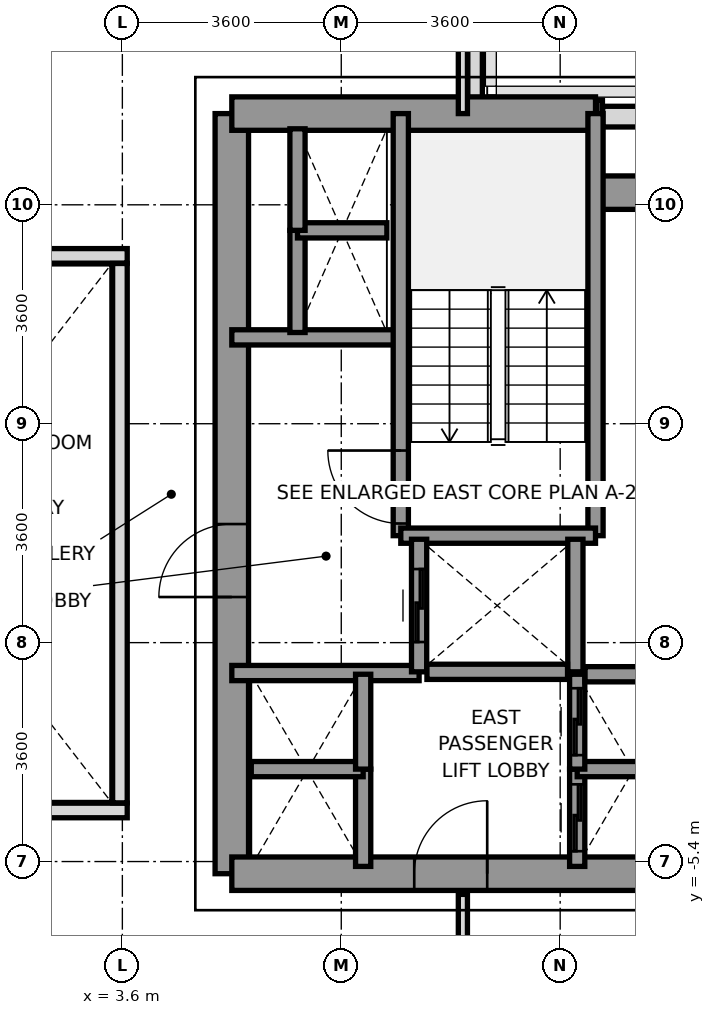
"""IFC4 building model, lengths in metres.
Left out: names, types, materials, properties, quantities, classifications, styles, units other than length and angle.
Written with IfcOpenShell. Run it as: python <this file> out.ifc"""

import sys

from ifc_helpers import new_model, si_unit, direction, frame, frame_2d, origin, place, context, subcontext, project, spatial, rectangle, extrude, source, transform, mapped, element, fill, save


model = new_model("IFC4")
c1 = context("Model", 3, precision=1e-05, world=origin(), true_north=direction((0.0, 1.0)))
c2 = subcontext(c1, "Body", "Model", "MODEL_VIEW")
j1 = project(units=[si_unit("LENGTHUNIT", "METRE"), si_unit("PLANEANGLEUNIT", "RADIAN")], contexts=[c1])
p1 = place(None, origin())
s1 = spatial("IfcSite", under=j1, at=p1, CompositionType="ELEMENT")
p2 = place(p1, origin())
s2 = spatial("IfcBuilding", under=s1, at=p2, CompositionType="ELEMENT")
p3 = place(p2, frame((0.0, 0.0, 44.2)))
s3 = spatial("IfcBuildingStorey", under=s2, at=p3, CompositionType="ELEMENT", Elevation=44.2)
p4 = place(p3, frame((11.498, 6.85, 0.0), z_axis=(0.0, 0.0, 1.0), x_axis=(1.0, 0.0, 0.0)))
e1 = element("IfcWall", 1, at=p4, inside=s3, PredefinedType="SOLIDWALL", context=c2, shape_type="SweptSolid", body=[
    extrude(rectangle(XDim=2.535, YDim=0.34, at=frame_2d((1.268, 0.0))), origin(), (0.0, 0.0, 1.0), 3.2),
])
p5 = place(p3, frame((9.4, 8.397, 0.0), z_axis=(0.0, 0.0, 1.0), x_axis=(0.0, -1.0, 0.0)))
e2 = element("IfcWall", 2, at=p5, inside=s3, PredefinedType="PARAPET", context=c2, shape_type="SweptSolid", body=[
    extrude(rectangle(XDim=1.444, YDim=0.24, at=frame_2d((0.722, 0.0))), origin(), (0.0, 0.0, 1.0), 1.15),
])
p6 = place(p3, frame((11.403, 7.0, 0.0), z_axis=(0.0, 0.0, 1.0), x_axis=(1.0, 0.0, 0.0)))
e3 = element("IfcWall", 3, at=p6, inside=s3, PredefinedType="PARAPET", context=c2, shape_type="SweptSolid", body=[
    extrude(rectangle(XDim=0.092, YDim=0.24, at=frame_2d((0.046, 0.0))), origin(), (0.0, 0.0, 1.0), 1.15),
])
p7 = place(p3, frame((5.4, -5.6, 0.0), z_axis=(0.0, 0.0, 1.0), x_axis=(0.0, 1.0, 0.0)))
e4 = element("IfcWall", 4, at=p7, inside=s3, PredefinedType="SHEAR", context=c2, shape_type="SweptSolid", body=[
    extrude(rectangle(XDim=12.5, YDim=0.55, at=frame_2d((6.25, 0.0))), origin(), (0.0, 0.0, 1.0), 3.2),
])
p8 = place(p7, frame((4.55, 0.0, 0.0)))
e5 = element("IfcOpeningElement", 5, at=p8, cuts=e4, PredefinedType="OPENING", context=c2, shape_type="SweptSolid", body=[
    extrude(rectangle(XDim=1.2, YDim=2.2, at=frame_2d((0.6, 1.1))), frame((0.0, 0.285, 0.0), z_axis=(0.0, -1.0, 0.0), x_axis=(1.0, 0.0, 0.0)), (0.0, 0.0, 1.0), 0.57),
])
p9 = place(p3, frame((5.4, 6.9, 0.0), z_axis=(0.0, 0.0, 1.0), x_axis=(1.0, 0.0, 0.0)))
e6 = element("IfcWall", 6, at=p9, inside=s3, PredefinedType="SHEAR", context=c2, shape_type="SweptSolid", body=[
    extrude(rectangle(XDim=5.981, YDim=0.55, at=frame_2d((2.991, 0.0))), origin(), (0.0, 0.0, 1.0), 3.2),
])
p10 = place(p3, frame((11.381, 5.6, 0.0), z_axis=(0.0, 0.0, 1.0), x_axis=(1.0, 0.0, 0.0)))
e7 = element("IfcWall", 7, at=p10, inside=s3, PredefinedType="SHEAR", context=c2, shape_type="SweptSolid", body=[
    extrude(rectangle(XDim=1.819, YDim=0.55, at=frame_2d((0.909, 0.0))), origin(), (0.0, 0.0, 1.0), 3.2),
])
p11 = place(p3, frame((5.4, -5.6, 0.0), z_axis=(0.0, 0.0, 1.0), x_axis=(1.0, 0.0, 0.0)))
e8 = element("IfcWall", 8, at=p11, inside=s3, PredefinedType="SHEAR", context=c2, shape_type="SweptSolid", body=[
    extrude(rectangle(XDim=7.8, YDim=0.55, at=frame_2d((3.9, 0.0))), origin(), (0.0, 0.0, 1.0), 3.2),
])
p12 = place(p11, frame((3.0, 0.0, 0.0)))
e9 = element("IfcOpeningElement", 9, at=p12, cuts=e8, PredefinedType="OPENING", context=c2, shape_type="SweptSolid", body=[
    extrude(rectangle(XDim=1.2, YDim=2.2, at=frame_2d((0.6, 1.1))), frame((0.0, 0.285, 0.0), z_axis=(0.0, -1.0, 0.0), x_axis=(1.0, 0.0, 0.0)), (0.0, 0.0, 1.0), 0.57),
])
p13 = place(p3, frame((5.4, 3.22, 0.0), z_axis=(0.0, 0.0, 1.0), x_axis=(1.0, 0.0, 0.0)))
e10 = element("IfcWall", 10, at=p13, inside=s3, PredefinedType="SOLIDWALL", context=c2, shape_type="SweptSolid", body=[
    extrude(rectangle(XDim=2.78, YDim=0.25, at=frame_2d((1.39, 0.0))), origin(), (0.0, 0.0, 1.0), 3.2),
])
p14 = place(p3, frame((5.4, -2.3, 0.0), z_axis=(0.0, 0.0, 1.0), x_axis=(1.0, 0.0, 0.0)))
e11 = element("IfcWall", 11, at=p14, inside=s3, PredefinedType="SOLIDWALL", context=c2, shape_type="SweptSolid", body=[
    extrude(rectangle(XDim=3.08, YDim=0.25, at=frame_2d((1.54, 0.0))), origin(), (0.0, 0.0, 1.0), 3.2),
])
p15 = place(p3, frame((8.179, -0.041, 0.0), z_axis=(0.0, 0.0, 1.0), x_axis=(0.0, 1.0, 0.0)))
e12 = element("IfcWall", 12, at=p15, inside=s3, PredefinedType="SOLIDWALL", context=c2, shape_type="SweptSolid", body=[
    extrude(rectangle(XDim=6.941, YDim=0.25, at=frame_2d((3.47, 0.0))), origin(), (0.0, 0.0, 1.0), 3.2),
])
p16 = place(p15, frame((0.2, 0.0, 0.0)))
e13 = element("IfcOpeningElement", 13, at=p16, cuts=e12, PredefinedType="OPENING", context=c2, shape_type="SweptSolid", body=[
    extrude(rectangle(XDim=1.2, YDim=2.2, at=frame_2d((0.6, 1.1))), frame((0.0, 0.135, 0.0), z_axis=(0.0, -1.0, 0.0), x_axis=(1.0, 0.0, 0.0)), (0.0, 0.0, 1.0), 0.27),
])
p17 = place(p3, frame((11.381, -0.041, 0.0), z_axis=(0.0, 0.0, 1.0), x_axis=(0.0, 1.0, 0.0)))
e14 = element("IfcWall", 14, at=p17, inside=s3, PredefinedType="SOLIDWALL", context=c2, shape_type="SweptSolid", body=[
    extrude(rectangle(XDim=6.941, YDim=0.25, at=frame_2d((3.47, 0.0))), origin(), (0.0, 0.0, 1.0), 3.2),
])
p18 = place(p3, frame((8.179, -0.041, 0.0), z_axis=(0.0, 0.0, 1.0), x_axis=(1.0, 0.0, 0.0)))
e15 = element("IfcWall", 15, at=p18, inside=s3, PredefinedType="SOLIDWALL", context=c2, shape_type="SweptSolid", body=[
    extrude(rectangle(XDim=3.202, YDim=0.25, at=frame_2d((1.601, 0.0))), origin(), (0.0, 0.0, 1.0), 3.2),
])
p19 = place(p3, frame((8.48, -2.28, 0.0), z_axis=(0.0, 0.0, 1.0), x_axis=(0.0, 1.0, 0.0)))
e16 = element("IfcWall", 16, at=p19, inside=s3, PredefinedType="SOLIDWALL", context=c2, shape_type="SweptSolid", body=[
    extrude(rectangle(XDim=2.18, YDim=0.25, at=frame_2d((1.09, 0.0))), origin(), (0.0, 0.0, 1.0), 3.2),
])
p20 = place(p19, frame((0.49, 0.0, 0.0)))
e17 = element("IfcOpeningElement", 17, at=p20, cuts=e16, PredefinedType="OPENING", context=c2, shape_type="SweptSolid", body=[
    extrude(rectangle(XDim=1.2, YDim=2.2, at=frame_2d((0.6, 1.1))), frame((0.0, 0.135, 0.0), z_axis=(0.0, -1.0, 0.0), x_axis=(1.0, 0.0, 0.0)), (0.0, 0.0, 1.0), 0.27),
])
p21 = place(p3, frame((11.05, -2.28, 0.0), z_axis=(0.0, 0.0, 1.0), x_axis=(0.0, 1.0, 0.0)))
e18 = element("IfcWall", 18, at=p21, inside=s3, PredefinedType="SOLIDWALL", context=c2, shape_type="SweptSolid", body=[
    extrude(rectangle(XDim=2.18, YDim=0.25, at=frame_2d((1.09, 0.0))), origin(), (0.0, 0.0, 1.0), 3.2),
])
p22 = place(p3, frame((8.609, -2.28, 0.0), z_axis=(0.0, 0.0, 1.0), x_axis=(1.0, 0.0, 0.0)))
e19 = element("IfcWall", 19, at=p22, inside=s3, PredefinedType="SOLIDWALL", context=c2, shape_type="SweptSolid", body=[
    extrude(rectangle(XDim=2.312, YDim=0.25, at=frame_2d((1.156, 0.0))), origin(), (0.0, 0.0, 1.0), 3.2),
])
p23 = place(p3, frame((11.08, -5.48, 0.0), z_axis=(0.0, 0.0, 1.0), x_axis=(0.0, 1.0, 0.0)))
e20 = element("IfcWall", 20, at=p23, inside=s3, PredefinedType="SOLIDWALL", context=c2, shape_type="SweptSolid", body=[
    extrude(rectangle(XDim=1.6, YDim=0.25, at=frame_2d((0.8, 0.0))), origin(), (0.0, 0.0, 1.0), 3.2),
])
p24 = place(p23, frame((0.25, 0.0, 0.0)))
e21 = element("IfcOpeningElement", 21, at=p24, cuts=e20, PredefinedType="OPENING", context=c2, shape_type="SweptSolid", body=[
    extrude(rectangle(XDim=1.1, YDim=2.2, at=frame_2d((0.55, 1.1))), frame((0.0, 0.135, 0.0), z_axis=(0.0, -1.0, 0.0), x_axis=(1.0, 0.0, 0.0)), (0.0, 0.0, 1.0), 0.27),
])
p25 = place(p3, frame((11.08, -3.88, 0.0), z_axis=(0.0, 0.0, 1.0), x_axis=(1.0, 0.0, 0.0)))
e22 = element("IfcWall", 22, at=p25, inside=s3, PredefinedType="SOLIDWALL", context=c2, shape_type="SweptSolid", body=[
    extrude(rectangle(XDim=1.84, YDim=0.25, at=frame_2d((0.92, 0.0))), origin(), (0.0, 0.0, 1.0), 3.2),
])
p26 = place(p3, frame((11.08, -3.88, 0.0), z_axis=(0.0, 0.0, 1.0), x_axis=(0.0, 1.0, 0.0)))
e23 = element("IfcWall", 23, at=p26, inside=s3, PredefinedType="SOLIDWALL", context=c2, shape_type="SweptSolid", body=[
    extrude(rectangle(XDim=1.56, YDim=0.25, at=frame_2d((0.78, 0.0))), origin(), (0.0, 0.0, 1.0), 3.2),
])
p27 = place(p26, frame((0.23, 0.0, 0.0)))
e24 = element("IfcOpeningElement", 24, at=p27, cuts=e23, PredefinedType="OPENING", context=c2, shape_type="SweptSolid", body=[
    extrude(rectangle(XDim=1.1, YDim=2.2, at=frame_2d((0.55, 1.1))), frame((0.0, 0.135, 0.0), z_axis=(0.0, -1.0, 0.0), x_axis=(1.0, 0.0, 0.0)), (0.0, 0.0, 1.0), 0.27),
])
p28 = place(p3, frame((11.209, -2.32, 0.0), z_axis=(0.0, 0.0, 1.0), x_axis=(1.0, 0.0, 0.0)))
e25 = element("IfcWall", 25, at=p28, inside=s3, PredefinedType="SOLIDWALL", context=c2, shape_type="SweptSolid", body=[
    extrude(rectangle(XDim=1.582, YDim=0.25, at=frame_2d((0.791, 0.0))), origin(), (0.0, 0.0, 1.0), 3.2),
])
p29 = place(p3, frame((7.56, -5.48, 0.0), z_axis=(0.0, 0.0, 1.0), x_axis=(0.0, 1.0, 0.0)))
e26 = element("IfcWall", 26, at=p29, inside=s3, PredefinedType="SOLIDWALL", context=c2, shape_type="SweptSolid", body=[
    extrude(rectangle(XDim=1.6, YDim=0.25, at=frame_2d((0.8, 0.0))), origin(), (0.0, 0.0, 1.0), 3.2),
])
p30 = place(p3, frame((5.72, -3.88, 0.0), z_axis=(0.0, 0.0, 1.0), x_axis=(1.0, 0.0, 0.0)))
e27 = element("IfcWall", 27, at=p30, inside=s3, PredefinedType="SOLIDWALL", context=c2, shape_type="SweptSolid", body=[
    extrude(rectangle(XDim=1.84, YDim=0.25, at=frame_2d((0.92, 0.0))), origin(), (0.0, 0.0, 1.0), 3.2),
])
p31 = place(p3, frame((7.56, -3.88, 0.0), z_axis=(0.0, 0.0, 1.0), x_axis=(0.0, 1.0, 0.0)))
e28 = element("IfcWall", 28, at=p31, inside=s3, PredefinedType="SOLIDWALL", context=c2, shape_type="SweptSolid", body=[
    extrude(rectangle(XDim=1.56, YDim=0.25, at=frame_2d((0.78, 0.0))), origin(), (0.0, 0.0, 1.0), 3.2),
])
p32 = place(p3, frame((6.48, 3.3, 0.0), z_axis=(0.0, 0.0, 1.0), x_axis=(0.0, 1.0, 0.0)))
e29 = element("IfcWall", 29, at=p32, inside=s3, PredefinedType="SOLIDWALL", context=c2, shape_type="SweptSolid", body=[
    extrude(rectangle(XDim=1.68, YDim=0.25, at=frame_2d((0.84, 0.0))), origin(), (0.0, 0.0, 1.0), 3.2),
])
p33 = place(p3, frame((6.48, 4.98, 0.0), z_axis=(0.0, 0.0, 1.0), x_axis=(1.0, 0.0, 0.0)))
e30 = element("IfcWall", 30, at=p33, inside=s3, PredefinedType="SOLIDWALL", context=c2, shape_type="SweptSolid", body=[
    extrude(rectangle(XDim=1.47, YDim=0.25, at=frame_2d((0.735, 0.0))), origin(), (0.0, 0.0, 1.0), 3.2),
])
p34 = place(p3, frame((6.48, 4.98, 0.0), z_axis=(0.0, 0.0, 1.0), x_axis=(0.0, 1.0, 0.0)))
e31 = element("IfcWall", 31, at=p34, inside=s3, PredefinedType="SOLIDWALL", context=c2, shape_type="SweptSolid", body=[
    extrude(rectangle(XDim=1.67, YDim=0.25, at=frame_2d((0.835, 0.0))), origin(), (0.0, 0.0, 1.0), 3.2),
])
p35 = place(p3, frame((9.2, 6.9, 0.0), z_axis=(0.0, 0.0, 1.0), x_axis=(0.0, 1.0, 0.0)))
e32 = element("IfcWall", 32, at=p35, inside=s3, PredefinedType="PARTITIONING", context=c2, shape_type="SweptSolid", body=[
    extrude(rectangle(XDim=8.78, YDim=0.15, at=frame_2d((4.39, 0.0))), origin(), (0.0, 0.0, 1.0), 2.65),
])
p36 = place(p3, frame((9.2, -15.68, 0.0), z_axis=(0.0, 0.0, 1.0), x_axis=(0.0, 1.0, 0.0)))
e33 = element("IfcWall", 33, at=p36, inside=s3, PredefinedType="PARTITIONING", context=c2, shape_type="SweptSolid", body=[
    extrude(rectangle(XDim=9.74, YDim=0.15, at=frame_2d((4.87, 0.0))), origin(), (0.0, 0.0, 1.0), 2.65),
])
for number, where, z_axis, x_axis in (
    (34, (-3.68, -4.56, 0.0), (0.0, 0.0, 1.0), (1.0, 0.0, 0.0)),
    (35, (-3.68, 4.56, 0.0), (0.0, 0.0, 1.0), (1.0, 0.0, 0.0)),
):
    element("IfcWall", number, at=place(p3, frame(where, z_axis=z_axis, x_axis=x_axis)), inside=s3, PredefinedType="PARAPET", context=c2, shape_type="SweptSolid", body=[
        extrude(rectangle(XDim=7.36, YDim=0.24, at=frame_2d((3.68, 0.0))), origin(), (0.0, 0.0, 1.0), 1.15),
    ])
p37 = place(p3, frame((3.56, -4.435, 0.0), z_axis=(0.0, 0.0, 1.0), x_axis=(0.0, 1.0, 0.0)))
e36 = element("IfcWall", 36, at=p37, inside=s3, PredefinedType="PARAPET", context=c2, shape_type="SweptSolid", body=[
    extrude(rectangle(XDim=8.87, YDim=0.24, at=frame_2d((4.435, 0.0))), origin(), (0.0, 0.0, 1.0), 1.15),
])
m1 = source(origin(), c2, "Body", "SweptSolid", [
    extrude(rectangle(XDim=1.2, YDim=2.2, at=frame_2d((0.6, 1.1))), frame((0.0, 0.025, 0.0), z_axis=(0.0, -1.0, 0.0), x_axis=(1.0, 0.0, 0.0)), (0.0, 0.0, 1.0), 0.05),
])
p38 = place(p16, origin())
e37 = element("IfcDoor", 37, at=p38, inside=s3, OperationType="SINGLE_SWING_RIGHT", PredefinedType="DOOR", context=c2, shape_type="MappedRepresentation", body=[
    mapped(m1, transform((0.0, 0.0, 0.0), x_axis=(1.0, 0.0, 0.0), y_axis=(0.0, 1.0, 0.0), z_axis=(0.0, 0.0, 1.0), scale=1.0)),
])
fill(e13, e37)
p39 = place(p8, origin())
e38 = element("IfcDoor", 38, at=p39, inside=s3, OperationType="SINGLE_SWING_LEFT", PredefinedType="DOOR", context=c2, shape_type="MappedRepresentation", body=[
    mapped(m1, transform((0.0, 0.0, 0.0), x_axis=(1.0, 0.0, 0.0), y_axis=(0.0, 1.0, 0.0), z_axis=(0.0, 0.0, 1.0), scale=1.0)),
])
fill(e5, e38)
p40 = place(p12, origin())
e39 = element("IfcDoor", 39, at=p40, inside=s3, OperationType="SINGLE_SWING_RIGHT", PredefinedType="DOOR", context=c2, shape_type="MappedRepresentation", body=[
    mapped(m1, transform((0.0, 0.0, 0.0), x_axis=(1.0, 0.0, 0.0), y_axis=(0.0, 1.0, 0.0), z_axis=(0.0, 0.0, 1.0), scale=1.0)),
])
fill(e9, e39)
p41 = place(p20, origin())
e40 = element("IfcDoor", 40, at=p41, inside=s3, OperationType="SLIDING_TO_RIGHT", PredefinedType="DOOR", context=c2, shape_type="MappedRepresentation", body=[
    mapped(m1, transform((0.0, 0.0, 0.0), x_axis=(1.0, 0.0, 0.0), y_axis=(0.0, 1.0, 0.0), z_axis=(0.0, 0.0, 1.0), scale=1.0)),
])
fill(e17, e40)
m2 = source(origin(), c2, "Body", "SweptSolid", [
    extrude(rectangle(XDim=1.1, YDim=2.2, at=frame_2d((0.55, 1.1))), frame((0.0, 0.025, 0.0), z_axis=(0.0, -1.0, 0.0), x_axis=(1.0, 0.0, 0.0)), (0.0, 0.0, 1.0), 0.05),
])
p42 = place(p24, origin())
e41 = element("IfcDoor", 41, at=p42, inside=s3, OperationType="SLIDING_TO_LEFT", PredefinedType="DOOR", context=c2, shape_type="MappedRepresentation", body=[
    mapped(m2, transform((0.0, 0.0, 0.0), x_axis=(1.0, 0.0, 0.0), y_axis=(0.0, 1.0, 0.0), z_axis=(0.0, 0.0, 1.0), scale=1.0)),
])
fill(e21, e41)
p43 = place(p27, origin())
e42 = element("IfcDoor", 42, at=p43, inside=s3, OperationType="SLIDING_TO_LEFT", PredefinedType="DOOR", context=c2, shape_type="MappedRepresentation", body=[
    mapped(m2, transform((0.0, 0.0, 0.0), x_axis=(1.0, 0.0, 0.0), y_axis=(0.0, 1.0, 0.0), z_axis=(0.0, 0.0, 1.0), scale=1.0)),
])
fill(e24, e42)
save(model, sys.argv[1])
